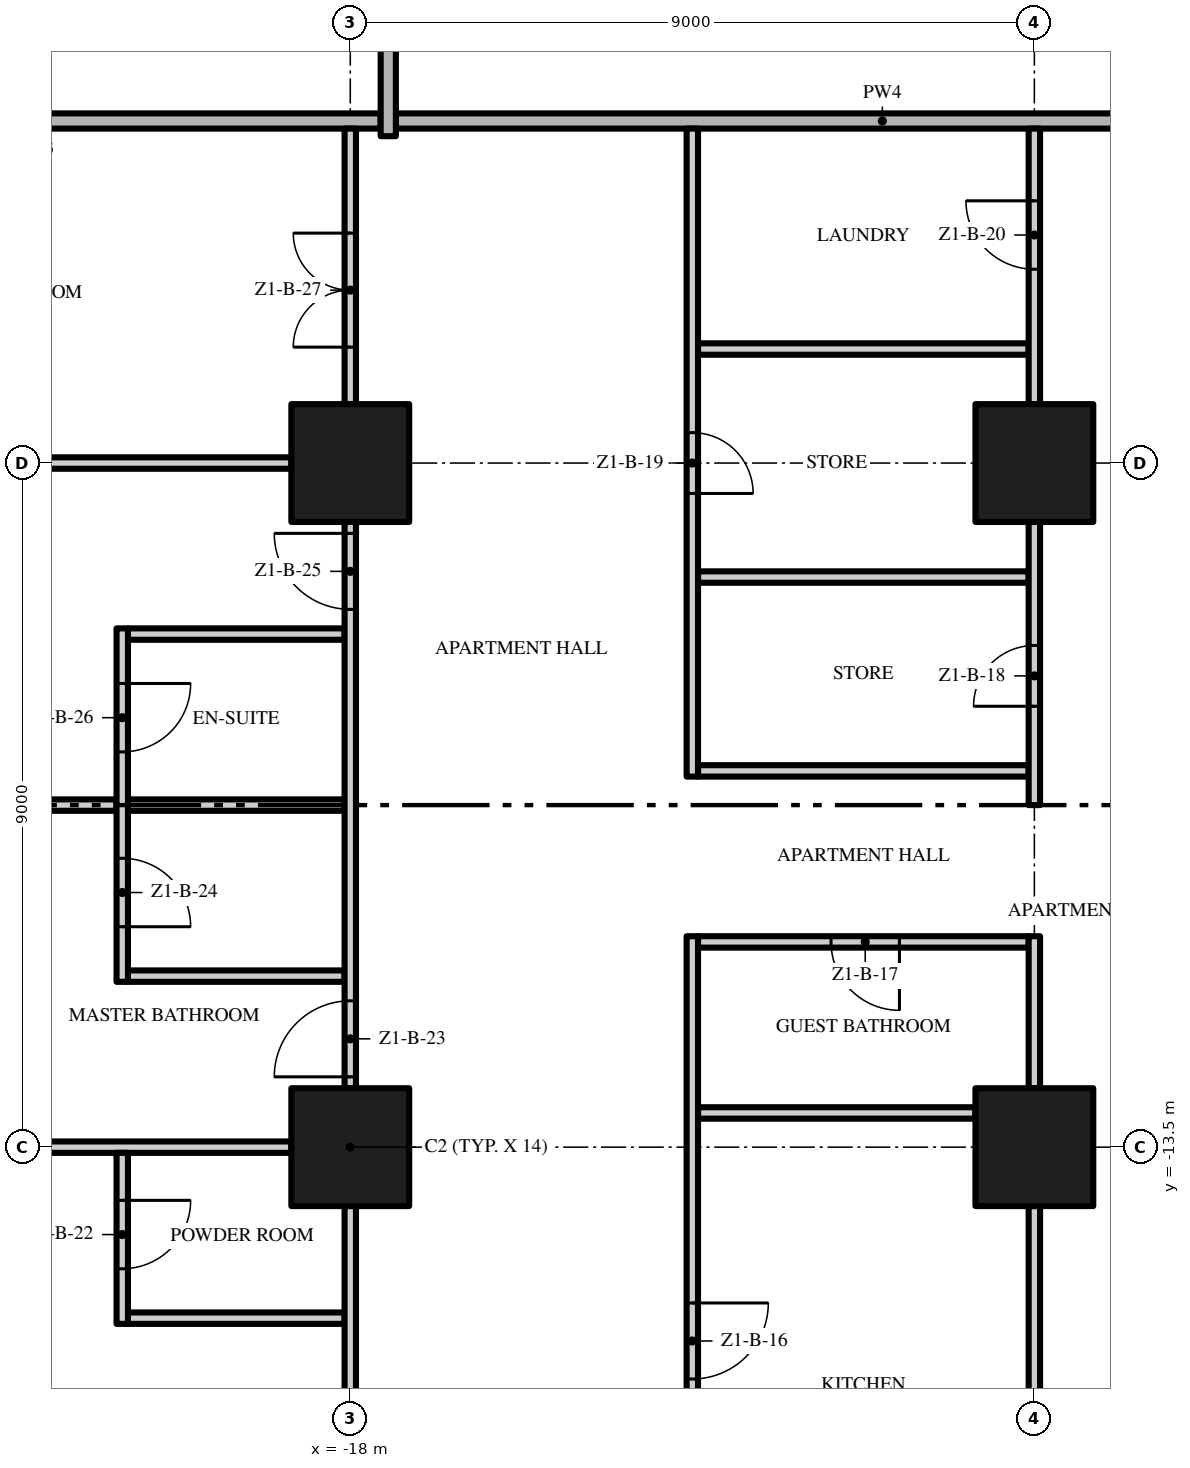
"""IFC4 building model, lengths in metres.
Left out: names, types, materials, properties, quantities, classifications, styles, units other than length and angle.
Written with IfcOpenShell. Run it as: python <this file> out.ifc"""

import sys

from ifc_helpers import new_model, si_unit, direction, frame, frame_2d, origin, origin_2d, place, context, subcontext, project, spatial, rectangle, extrude, element, fill, save


model = new_model("IFC4")
c1 = context("Model", 3, precision=1e-05, world=origin(), true_north=direction((0.0, 1.0)))
c2 = subcontext(c1, "Body", "Model", "MODEL_VIEW")
j1 = project(units=[si_unit("LENGTHUNIT", "METRE"), si_unit("PLANEANGLEUNIT", "RADIAN")], contexts=[c1])
p1 = place(None, origin())
s1 = spatial("IfcSite", under=j1, at=p1, CompositionType="ELEMENT")
p2 = place(p1, origin())
s2 = spatial("IfcBuilding", under=s1, at=p2, CompositionType="ELEMENT")
p3 = place(p2, frame((0.0, 0.0, 26.4)))
s3 = spatial("IfcBuildingStorey", under=s2, at=p3, CompositionType="ELEMENT", Elevation=26.4)
for number, where, z_axis, x_axis in (
    (1, (-18.0, -13.5, 0.0), (0.0, 0.0, 1.0), (1.0, 0.0, 0.0)),
    (2, (-18.0, -4.5, 0.0), (0.0, 0.0, 1.0), (1.0, 0.0, 0.0)),
    (3, (-9.0, -13.5, 0.0), (0.0, 0.0, 1.0), (1.0, 0.0, 0.0)),
    (4, (-9.0, -4.5, 0.0), (0.0, 0.0, 1.0), (1.0, 0.0, 0.0)),
):
    element("IfcColumn", number, at=place(p3, frame(where, z_axis=z_axis, x_axis=x_axis)), inside=s3, PredefinedType="COLUMN", context=c2, shape_type="SweptSolid", body=[
        extrude(rectangle(XDim=1.55, YDim=1.55, at=origin_2d()), origin(), (0.0, 0.0, 1.0), 3.5),
    ])
p4 = place(p3, frame((-20.925, -15.75, 0.0), z_axis=(0.0, 0.0, 1.0), x_axis=(1.0, 0.0, 0.0)))
e5 = element("IfcWall", 5, at=p4, inside=s3, PredefinedType="PARTITIONING", context=c2, shape_type="SweptSolid", body=[
    extrude(rectangle(XDim=2.85, YDim=0.15, at=frame_2d((1.425, 0.0))), origin(), (0.0, 0.0, 1.0), 3.5),
])
p5 = place(p3, frame((-25.55, -13.5, 0.0), z_axis=(0.0, 0.0, 1.0), x_axis=(1.0, 0.0, 0.0)))
e6 = element("IfcWall", 6, at=p5, inside=s3, PredefinedType="PARTITIONING", context=c2, shape_type="SweptSolid", body=[
    extrude(rectangle(XDim=6.775, YDim=0.15, at=frame_2d((3.388, 0.0))), origin(), (0.0, 0.0, 1.0), 3.5),
])
p6 = place(p3, frame((-13.425, -13.05, 0.0), z_axis=(0.0, 0.0, 1.0), x_axis=(1.0, 0.0, 0.0)))
e7 = element("IfcWall", 7, at=p6, inside=s3, PredefinedType="PARTITIONING", context=c2, shape_type="SweptSolid", body=[
    extrude(rectangle(XDim=3.65, YDim=0.15, at=frame_2d((1.825, 0.0))), origin(), (0.0, 0.0, 1.0), 3.5),
])
p7 = place(p3, frame((-20.925, -11.25, 0.0), z_axis=(0.0, 0.0, 1.0), x_axis=(1.0, 0.0, 0.0)))
e8 = element("IfcWall", 8, at=p7, inside=s3, PredefinedType="PARTITIONING", context=c2, shape_type="SweptSolid", body=[
    extrude(rectangle(XDim=2.85, YDim=0.15, at=frame_2d((1.425, 0.0))), origin(), (0.0, 0.0, 1.0), 3.5),
])
p8 = place(p3, frame((-9.075, -10.8, 0.0), z_axis=(0.0, 0.0, 1.0), x_axis=(-1.0, 0.0, 0.0)))
e9 = element("IfcWall", 9, at=p8, inside=s3, PredefinedType="PARTITIONING", context=c2, shape_type="SweptSolid", body=[
    extrude(rectangle(XDim=4.35, YDim=0.15, at=frame_2d((2.175, 0.0))), origin(), (0.0, 0.0, 1.0), 3.5),
])
p9 = place(p8, frame((1.7, 0.0, 0.0)))
e10 = element("IfcOpeningElement", 10, at=p9, cuts=e9, PredefinedType="OPENING", context=c2, shape_type="SweptSolid", body=[
    extrude(rectangle(XDim=0.9, YDim=2.1, at=frame_2d((0.45, 1.05))), frame((0.0, 0.085, 0.0), z_axis=(0.0, -1.0, 0.0), x_axis=(1.0, 0.0, 0.0)), (0.0, 0.0, 1.0), 0.17),
])
p10 = place(p3, frame((-26.7, -9.0, 0.0), z_axis=(0.0, 0.0, 1.0), x_axis=(1.0, 0.0, 0.0)))
e11 = element("IfcWall", 11, at=p10, inside=s3, PredefinedType="PARTITIONING", context=c2, shape_type="SweptSolid", body=[
    extrude(rectangle(XDim=5.625, YDim=0.15, at=frame_2d((2.812, 0.0))), origin(), (0.0, 0.0, 1.0), 3.5),
])
p11 = place(p3, frame((-20.925, -9.0, 0.0), z_axis=(0.0, 0.0, 1.0), x_axis=(1.0, 0.0, 0.0)))
e12 = element("IfcWall", 12, at=p11, inside=s3, PredefinedType="PARTITIONING", context=c2, shape_type="SweptSolid", body=[
    extrude(rectangle(XDim=2.85, YDim=0.15, at=frame_2d((1.425, 0.0))), origin(), (0.0, 0.0, 1.0), 3.5),
])
p12 = place(p3, frame((-13.425, -8.55, 0.0), z_axis=(0.0, 0.0, 1.0), x_axis=(1.0, 0.0, 0.0)))
e13 = element("IfcWall", 13, at=p12, inside=s3, PredefinedType="PARTITIONING", context=c2, shape_type="SweptSolid", body=[
    extrude(rectangle(XDim=4.35, YDim=0.15, at=frame_2d((2.175, 0.0))), origin(), (0.0, 0.0, 1.0), 3.5),
])
p13 = place(p3, frame((-20.925, -6.75, 0.0), z_axis=(0.0, 0.0, 1.0), x_axis=(1.0, 0.0, 0.0)))
e14 = element("IfcWall", 14, at=p13, inside=s3, PredefinedType="PARTITIONING", context=c2, shape_type="SweptSolid", body=[
    extrude(rectangle(XDim=2.85, YDim=0.15, at=frame_2d((1.425, 0.0))), origin(), (0.0, 0.0, 1.0), 3.5),
])
p14 = place(p3, frame((-13.425, -6.0, 0.0), z_axis=(0.0, 0.0, 1.0), x_axis=(1.0, 0.0, 0.0)))
e15 = element("IfcWall", 15, at=p14, inside=s3, PredefinedType="PARTITIONING", context=c2, shape_type="SweptSolid", body=[
    extrude(rectangle(XDim=4.35, YDim=0.15, at=frame_2d((2.175, 0.0))), origin(), (0.0, 0.0, 1.0), 3.5),
])
p15 = place(p3, frame((-25.55, -4.5, 0.0), z_axis=(0.0, 0.0, 1.0), x_axis=(1.0, 0.0, 0.0)))
e16 = element("IfcWall", 16, at=p15, inside=s3, PredefinedType="PARTITIONING", context=c2, shape_type="SweptSolid", body=[
    extrude(rectangle(XDim=6.775, YDim=0.15, at=frame_2d((3.388, 0.0))), origin(), (0.0, 0.0, 1.0), 3.5),
])
p16 = place(p3, frame((-13.425, -3.0, 0.0), z_axis=(0.0, 0.0, 1.0), x_axis=(1.0, 0.0, 0.0)))
e17 = element("IfcWall", 17, at=p16, inside=s3, PredefinedType="PARTITIONING", context=c2, shape_type="SweptSolid", body=[
    extrude(rectangle(XDim=4.35, YDim=0.15, at=frame_2d((2.175, 0.0))), origin(), (0.0, 0.0, 1.0), 3.5),
])
p17 = place(p3, frame((-17.4, 0.0, 0.0), z_axis=(0.0, 0.0, 1.0), x_axis=(1.0, 0.0, 0.0)))
e18 = element("IfcWall", 18, at=p17, inside=s3, PredefinedType="PARTITIONING", context=c2, shape_type="SweptSolid", body=[
    extrude(rectangle(XDim=12.8, YDim=0.2, at=frame_2d((6.4, 0.0))), origin(), (0.0, 0.0, 1.0), 3.5),
])
p18 = place(p3, frame((-26.7, 0.0, 0.0), z_axis=(0.0, 0.0, 1.0), x_axis=(1.0, 0.0, 0.0)))
e19 = element("IfcWall", 19, at=p18, inside=s3, PredefinedType="PARTITIONING", context=c2, shape_type="SweptSolid", body=[
    extrude(rectangle(XDim=9.1, YDim=0.2, at=frame_2d((4.55, 0.0))), origin(), (0.0, 0.0, 1.0), 3.5),
])
p19 = place(p3, frame((-21.0, -13.575, 0.0), z_axis=(0.0, 0.0, 1.0), x_axis=(0.0, -1.0, 0.0)))
e20 = element("IfcWall", 20, at=p19, inside=s3, PredefinedType="PARTITIONING", context=c2, shape_type="SweptSolid", body=[
    extrude(rectangle(XDim=2.25, YDim=0.15, at=frame_2d((1.125, 0.0))), origin(), (0.0, 0.0, 1.0), 3.5),
])
p20 = place(p19, frame((0.625, 0.0, 0.0)))
e21 = element("IfcOpeningElement", 21, at=p20, cuts=e20, PredefinedType="OPENING", context=c2, shape_type="SweptSolid", body=[
    extrude(rectangle(XDim=0.9, YDim=2.1, at=frame_2d((0.45, 1.05))), frame((0.0, 0.085, 0.0), z_axis=(0.0, -1.0, 0.0), x_axis=(1.0, 0.0, 0.0)), (0.0, 0.0, 1.0), 0.17),
])
p21 = place(p3, frame((-21.0, -6.675, 0.0), z_axis=(0.0, 0.0, 1.0), x_axis=(0.0, -1.0, 0.0)))
e22 = element("IfcWall", 22, at=p21, inside=s3, PredefinedType="PARTITIONING", context=c2, shape_type="SweptSolid", body=[
    extrude(rectangle(XDim=4.65, YDim=0.15, at=frame_2d((2.325, 0.0))), origin(), (0.0, 0.0, 1.0), 3.5),
])
p22 = place(p21, frame((3.025, 0.0, 0.0)))
e23 = element("IfcOpeningElement", 23, at=p22, cuts=e22, PredefinedType="OPENING", context=c2, shape_type="SweptSolid", body=[
    extrude(rectangle(XDim=0.9, YDim=2.1, at=frame_2d((0.45, 1.05))), frame((0.0, 0.085, 0.0), z_axis=(0.0, -1.0, 0.0), x_axis=(1.0, 0.0, 0.0)), (0.0, 0.0, 1.0), 0.17),
])
p23 = place(p21, frame((0.725, 0.0, 0.0)))
e24 = element("IfcOpeningElement", 24, at=p23, cuts=e22, PredefinedType="OPENING", context=c2, shape_type="SweptSolid", body=[
    extrude(rectangle(XDim=0.9, YDim=2.1, at=frame_2d((0.45, 1.05))), frame((0.0, 0.085, 0.0), z_axis=(0.0, -1.0, 0.0), x_axis=(1.0, 0.0, 0.0)), (0.0, 0.0, 1.0), 0.17),
])
p24 = place(p3, frame((-18.0, -21.05, 0.0), z_axis=(0.0, 0.0, 1.0), x_axis=(0.0, 1.0, 0.0)))
e25 = element("IfcWall", 25, at=p24, inside=s3, PredefinedType="PARTITIONING", context=c2, shape_type="SweptSolid", body=[
    extrude(rectangle(XDim=6.775, YDim=0.15, at=frame_2d((3.388, 0.0))), origin(), (0.0, 0.0, 1.0), 3.5),
])
p25 = place(p24, frame((1.0, 0.0, 0.0)))
e26 = element("IfcOpeningElement", 26, at=p25, cuts=e25, PredefinedType="OPENING", context=c2, shape_type="SweptSolid", body=[
    extrude(rectangle(XDim=1.8, YDim=2.4, at=frame_2d((0.9, 1.2))), frame((0.0, 0.085, 0.0), z_axis=(0.0, -1.0, 0.0), x_axis=(1.0, 0.0, 0.0)), (0.0, 0.0, 1.0), 0.17),
])
p26 = place(p3, frame((-18.0, -12.725, 0.0), z_axis=(0.0, 0.0, 1.0), x_axis=(0.0, 1.0, 0.0)))
e27 = element("IfcWall", 27, at=p26, inside=s3, PredefinedType="PARTITIONING", context=c2, shape_type="SweptSolid", body=[
    extrude(rectangle(XDim=7.45, YDim=0.15, at=frame_2d((3.725, 0.0))), origin(), (0.0, 0.0, 1.0), 3.5),
])
p27 = place(p26, frame((0.15, 0.0, 0.0)))
e28 = element("IfcOpeningElement", 28, at=p27, cuts=e27, PredefinedType="OPENING", context=c2, shape_type="SweptSolid", body=[
    extrude(rectangle(XDim=1.0, YDim=2.4, at=frame_2d((0.5, 1.2))), frame((0.0, 0.085, 0.0), z_axis=(0.0, -1.0, 0.0), x_axis=(1.0, 0.0, 0.0)), (0.0, 0.0, 1.0), 0.17),
])
p28 = place(p26, frame((6.3, 0.0, 0.0)))
e29 = element("IfcOpeningElement", 29, at=p28, cuts=e27, PredefinedType="OPENING", context=c2, shape_type="SweptSolid", body=[
    extrude(rectangle(XDim=1.0, YDim=2.4, at=frame_2d((0.5, 1.2))), frame((0.0, 0.085, 0.0), z_axis=(0.0, -1.0, 0.0), x_axis=(1.0, 0.0, 0.0)), (0.0, 0.0, 1.0), 0.17),
])
p29 = place(p3, frame((-18.0, -3.725, 0.0), z_axis=(0.0, 0.0, 1.0), x_axis=(0.0, 1.0, 0.0)))
e30 = element("IfcWall", 30, at=p29, inside=s3, PredefinedType="PARTITIONING", context=c2, shape_type="SweptSolid", body=[
    extrude(rectangle(XDim=3.625, YDim=0.15, at=frame_2d((1.812, 0.0))), origin(), (0.0, 0.0, 1.0), 3.5),
])
p30 = place(p29, frame((0.75, 0.0, 0.0)))
e31 = element("IfcOpeningElement", 31, at=p30, cuts=e30, PredefinedType="OPENING", context=c2, shape_type="SweptSolid", body=[
    extrude(rectangle(XDim=1.5, YDim=2.4, at=frame_2d((0.75, 1.2))), frame((0.0, 0.085, 0.0), z_axis=(0.0, -1.0, 0.0), x_axis=(1.0, 0.0, 0.0)), (0.0, 0.0, 1.0), 0.17),
])
p31 = place(p3, frame((-17.5, -0.2, 0.0), z_axis=(0.0, 0.0, 1.0), x_axis=(0.0, 1.0, 0.0)))
e32 = element("IfcWall", 32, at=p31, inside=s3, PredefinedType="PARTITIONING", context=c2, shape_type="SweptSolid", body=[
    extrude(rectangle(XDim=3.925, YDim=0.2, at=frame_2d((1.962, 0.0))), origin(), (0.0, 0.0, 1.0), 3.5),
])
p32 = place(p3, frame((-13.5, -10.725, 0.0), z_axis=(0.0, 0.0, 1.0), x_axis=(0.0, -1.0, 0.0)))
e33 = element("IfcWall", 33, at=p32, inside=s3, PredefinedType="PARTITIONING", context=c2, shape_type="SweptSolid", body=[
    extrude(rectangle(XDim=11.475, YDim=0.15, at=frame_2d((5.737, 0.0))), origin(), (0.0, 0.0, 1.0), 3.5),
])
p33 = place(p32, frame((10.475, 0.0, 0.0)))
e34 = element("IfcOpeningElement", 34, at=p33, cuts=e33, PredefinedType="OPENING", context=c2, shape_type="SweptSolid", body=[
    extrude(rectangle(XDim=0.8, YDim=2.0, at=frame_2d((0.4, 1.0))), frame((0.0, 0.085, 0.0), z_axis=(0.0, -1.0, 0.0), x_axis=(1.0, 0.0, 0.0)), (0.0, 0.0, 1.0), 0.17),
])
p34 = place(p32, frame((4.825, 0.0, 0.0)))
e35 = element("IfcOpeningElement", 35, at=p34, cuts=e33, PredefinedType="OPENING", context=c2, shape_type="SweptSolid", body=[
    extrude(rectangle(XDim=1.0, YDim=2.4, at=frame_2d((0.5, 1.2))), frame((0.0, 0.085, 0.0), z_axis=(0.0, -1.0, 0.0), x_axis=(1.0, 0.0, 0.0)), (0.0, 0.0, 1.0), 0.17),
])
p35 = place(p3, frame((-13.5, -0.1, 0.0), z_axis=(0.0, 0.0, 1.0), x_axis=(0.0, -1.0, 0.0)))
e36 = element("IfcWall", 36, at=p35, inside=s3, PredefinedType="PARTITIONING", context=c2, shape_type="SweptSolid", body=[
    extrude(rectangle(XDim=8.525, YDim=0.15, at=frame_2d((4.263, 0.0))), origin(), (0.0, 0.0, 1.0), 3.5),
])
p36 = place(p35, frame((4.0, 0.0, 0.0)))
e37 = element("IfcOpeningElement", 37, at=p36, cuts=e36, PredefinedType="OPENING", context=c2, shape_type="SweptSolid", body=[
    extrude(rectangle(XDim=0.8, YDim=2.0, at=frame_2d((0.4, 1.0))), frame((0.0, 0.085, 0.0), z_axis=(0.0, -1.0, 0.0), x_axis=(1.0, 0.0, 0.0)), (0.0, 0.0, 1.0), 0.17),
])
p37 = place(p3, frame((-9.0, -21.05, 0.0), z_axis=(0.0, 0.0, 1.0), x_axis=(0.0, 1.0, 0.0)))
e38 = element("IfcWall", 38, at=p37, inside=s3, PredefinedType="PARTITIONING", context=c2, shape_type="SweptSolid", body=[
    extrude(rectangle(XDim=6.775, YDim=0.15, at=frame_2d((3.388, 0.0))), origin(), (0.0, 0.0, 1.0), 3.5),
])
p38 = place(p37, frame((0.75, 0.0, 0.0)))
e39 = element("IfcOpeningElement", 39, at=p38, cuts=e38, PredefinedType="OPENING", context=c2, shape_type="SweptSolid", body=[
    extrude(rectangle(XDim=0.8, YDim=2.0, at=frame_2d((0.4, 1.0))), frame((0.0, 0.085, 0.0), z_axis=(0.0, -1.0, 0.0), x_axis=(1.0, 0.0, 0.0)), (0.0, 0.0, 1.0), 0.17),
])
p39 = place(p3, frame((-9.0, -12.725, 0.0), z_axis=(0.0, 0.0, 1.0), x_axis=(0.0, 1.0, 0.0)))
e40 = element("IfcWall", 40, at=p39, inside=s3, PredefinedType="PARTITIONING", context=c2, shape_type="SweptSolid", body=[
    extrude(rectangle(XDim=2.0, YDim=0.15, at=frame_2d((1.0, 0.0))), origin(), (0.0, 0.0, 1.0), 3.5),
])
p40 = place(p3, frame((-9.0, -9.0, 0.0), z_axis=(0.0, 0.0, 1.0), x_axis=(0.0, 1.0, 0.0)))
e41 = element("IfcWall", 41, at=p40, inside=s3, PredefinedType="PARTITIONING", context=c2, shape_type="SweptSolid", body=[
    extrude(rectangle(XDim=3.725, YDim=0.15, at=frame_2d((1.863, 0.0))), origin(), (0.0, 0.0, 1.0), 3.5),
])
p41 = place(p40, frame((1.3, 0.0, 0.0)))
e42 = element("IfcOpeningElement", 42, at=p41, cuts=e41, PredefinedType="OPENING", context=c2, shape_type="SweptSolid", body=[
    extrude(rectangle(XDim=0.8, YDim=2.0, at=frame_2d((0.4, 1.0))), frame((0.0, 0.085, 0.0), z_axis=(0.0, -1.0, 0.0), x_axis=(1.0, 0.0, 0.0)), (0.0, 0.0, 1.0), 0.17),
])
p42 = place(p3, frame((-9.0, -3.725, 0.0), z_axis=(0.0, 0.0, 1.0), x_axis=(0.0, 1.0, 0.0)))
e43 = element("IfcWall", 43, at=p42, inside=s3, PredefinedType="PARTITIONING", context=c2, shape_type="SweptSolid", body=[
    extrude(rectangle(XDim=3.625, YDim=0.15, at=frame_2d((1.812, 0.0))), origin(), (0.0, 0.0, 1.0), 3.5),
])
p43 = place(p42, frame((1.775, 0.0, 0.0)))
e44 = element("IfcOpeningElement", 44, at=p43, cuts=e43, PredefinedType="OPENING", context=c2, shape_type="SweptSolid", body=[
    extrude(rectangle(XDim=0.9, YDim=2.1, at=frame_2d((0.45, 1.05))), frame((0.0, 0.085, 0.0), z_axis=(0.0, -1.0, 0.0), x_axis=(1.0, 0.0, 0.0)), (0.0, 0.0, 1.0), 0.17),
])
p44 = place(p34, origin())
e45 = element("IfcDoor", 45, at=p44, inside=s3, OperationType="SINGLE_SWING_LEFT", PredefinedType="DOOR", context=c2, shape_type="SweptSolid", body=[
    extrude(rectangle(XDim=1.0, YDim=2.4, at=frame_2d((0.5, 1.2))), frame((0.0, 0.025, 0.0), z_axis=(0.0, -1.0, 0.0), x_axis=(1.0, 0.0, 0.0)), (0.0, 0.0, 1.0), 0.05),
])
fill(e35, e45)
p45 = place(p9, origin())
e46 = element("IfcDoor", 46, at=p45, inside=s3, OperationType="SINGLE_SWING_LEFT", PredefinedType="DOOR", context=c2, shape_type="SweptSolid", body=[
    extrude(rectangle(XDim=0.9, YDim=2.1, at=frame_2d((0.45, 1.05))), frame((0.0, 0.025, 0.0), z_axis=(0.0, -1.0, 0.0), x_axis=(1.0, 0.0, 0.0)), (0.0, 0.0, 1.0), 0.05),
])
fill(e10, e46)
p46 = place(p41, origin())
e47 = element("IfcDoor", 47, at=p46, inside=s3, OperationType="SINGLE_SWING_LEFT", PredefinedType="DOOR", context=c2, shape_type="SweptSolid", body=[
    extrude(rectangle(XDim=0.8, YDim=2.0, at=frame_2d((0.4, 1.0))), frame((0.0, 0.025, 0.0), z_axis=(0.0, -1.0, 0.0), x_axis=(1.0, 0.0, 0.0)), (0.0, 0.0, 1.0), 0.05),
])
fill(e42, e47)
p47 = place(p36, origin())
e48 = element("IfcDoor", 48, at=p47, inside=s3, OperationType="SINGLE_SWING_RIGHT", PredefinedType="DOOR", context=c2, shape_type="SweptSolid", body=[
    extrude(rectangle(XDim=0.8, YDim=2.0, at=frame_2d((0.4, 1.0))), frame((0.0, 0.025, 0.0), z_axis=(0.0, -1.0, 0.0), x_axis=(1.0, 0.0, 0.0)), (0.0, 0.0, 1.0), 0.05),
])
fill(e37, e48)
p48 = place(p43, origin())
e49 = element("IfcDoor", 49, at=p48, inside=s3, OperationType="SINGLE_SWING_RIGHT", PredefinedType="DOOR", context=c2, shape_type="SweptSolid", body=[
    extrude(rectangle(XDim=0.9, YDim=2.1, at=frame_2d((0.45, 1.05))), frame((0.0, 0.025, 0.0), z_axis=(0.0, -1.0, 0.0), x_axis=(1.0, 0.0, 0.0)), (0.0, 0.0, 1.0), 0.05),
])
fill(e44, e49)
p49 = place(p20, origin())
e50 = element("IfcDoor", 50, at=p49, inside=s3, OperationType="SINGLE_SWING_LEFT", PredefinedType="DOOR", context=c2, shape_type="SweptSolid", body=[
    extrude(rectangle(XDim=0.9, YDim=2.1, at=frame_2d((0.45, 1.05))), frame((0.0, 0.025, 0.0), z_axis=(0.0, -1.0, 0.0), x_axis=(1.0, 0.0, 0.0)), (0.0, 0.0, 1.0), 0.05),
])
fill(e21, e50)
p50 = place(p27, origin())
e51 = element("IfcDoor", 51, at=p50, inside=s3, OperationType="SINGLE_SWING_LEFT", PredefinedType="DOOR", context=c2, shape_type="SweptSolid", body=[
    extrude(rectangle(XDim=1.0, YDim=2.4, at=frame_2d((0.5, 1.2))), frame((0.0, 0.025, 0.0), z_axis=(0.0, -1.0, 0.0), x_axis=(1.0, 0.0, 0.0)), (0.0, 0.0, 1.0), 0.05),
])
fill(e28, e51)
p51 = place(p22, origin())
e52 = element("IfcDoor", 52, at=p51, inside=s3, OperationType="SINGLE_SWING_RIGHT", PredefinedType="DOOR", context=c2, shape_type="SweptSolid", body=[
    extrude(rectangle(XDim=0.9, YDim=2.1, at=frame_2d((0.45, 1.05))), frame((0.0, 0.025, 0.0), z_axis=(0.0, -1.0, 0.0), x_axis=(1.0, 0.0, 0.0)), (0.0, 0.0, 1.0), 0.05),
])
fill(e23, e52)
p52 = place(p28, origin())
e53 = element("IfcDoor", 53, at=p52, inside=s3, OperationType="SINGLE_SWING_RIGHT", PredefinedType="DOOR", context=c2, shape_type="SweptSolid", body=[
    extrude(rectangle(XDim=1.0, YDim=2.4, at=frame_2d((0.5, 1.2))), frame((0.0, 0.025, 0.0), z_axis=(0.0, -1.0, 0.0), x_axis=(1.0, 0.0, 0.0)), (0.0, 0.0, 1.0), 0.05),
])
fill(e29, e53)
p53 = place(p23, origin())
e54 = element("IfcDoor", 54, at=p53, inside=s3, OperationType="SINGLE_SWING_LEFT", PredefinedType="DOOR", context=c2, shape_type="SweptSolid", body=[
    extrude(rectangle(XDim=0.9, YDim=2.1, at=frame_2d((0.45, 1.05))), frame((0.0, 0.025, 0.0), z_axis=(0.0, -1.0, 0.0), x_axis=(1.0, 0.0, 0.0)), (0.0, 0.0, 1.0), 0.05),
])
fill(e24, e54)
p54 = place(p30, origin())
e55 = element("IfcDoor", 55, at=p54, inside=s3, OperationType="DOUBLE_DOOR_SINGLE_SWING", PredefinedType="DOOR", context=c2, shape_type="SweptSolid", body=[
    extrude(rectangle(XDim=1.5, YDim=2.4, at=frame_2d((0.75, 1.2))), frame((0.0, 0.025, 0.0), z_axis=(0.0, -1.0, 0.0), x_axis=(1.0, 0.0, 0.0)), (0.0, 0.0, 1.0), 0.05),
])
fill(e31, e55)
save(model, sys.argv[1])
